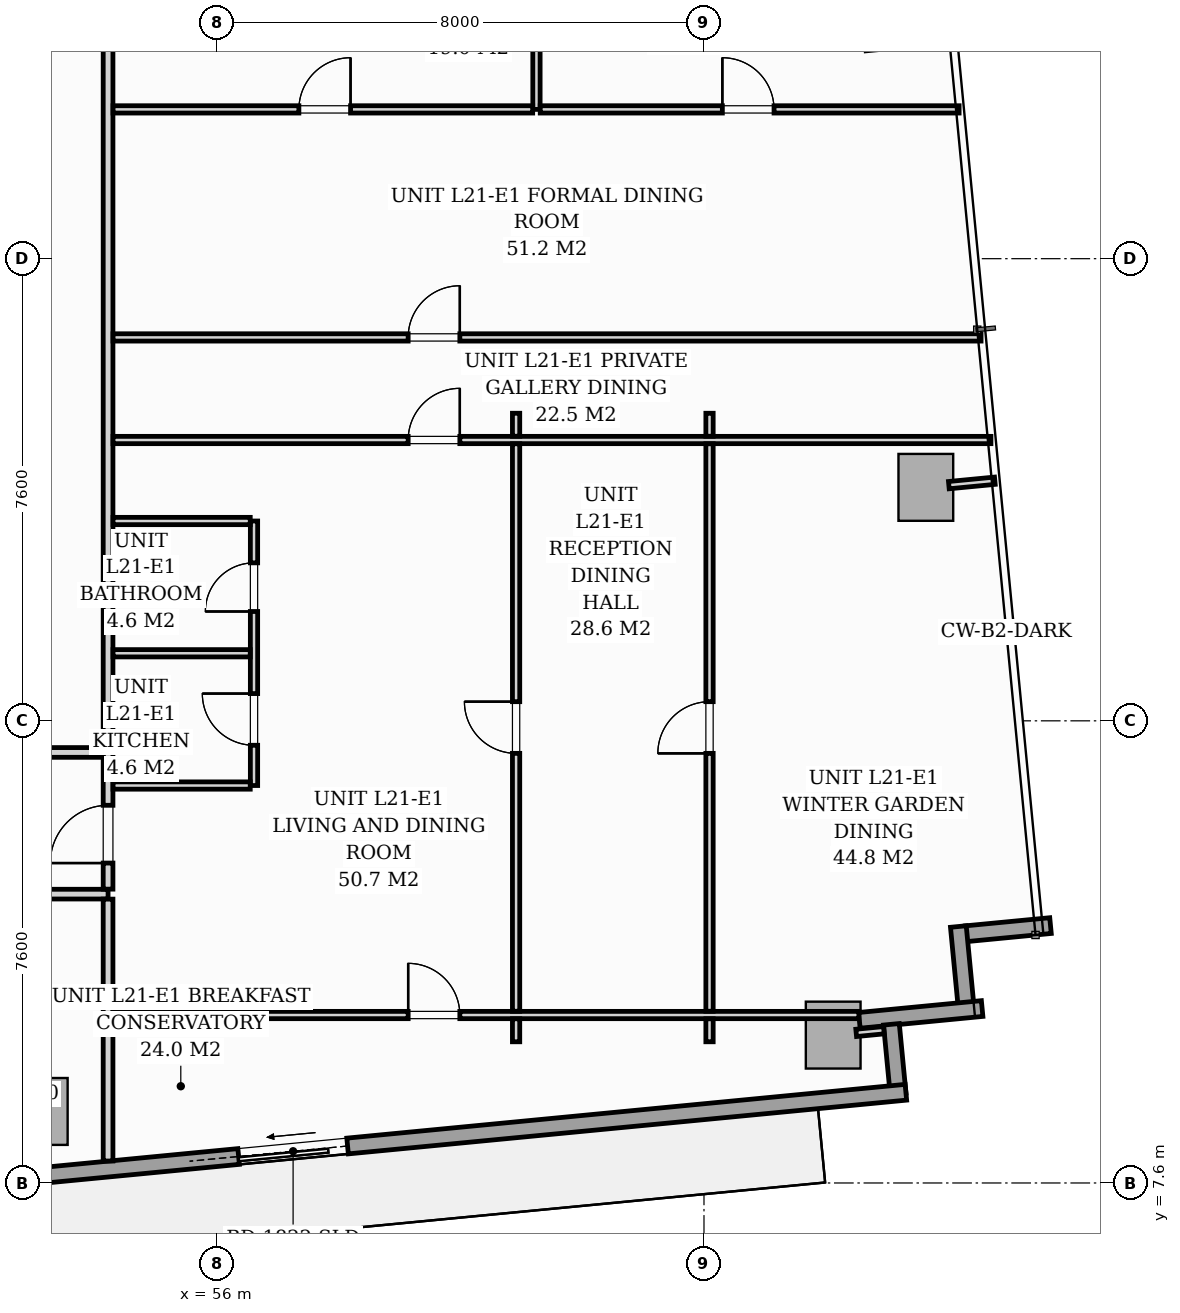
"""IFC4 building model, lengths in metres.
Left out: names, types, materials, properties, quantities, classifications, styles, units other than length and angle.
Written with IfcOpenShell. Run it as: python <this file> out.ifc"""

import sys

from ifc_helpers import new_model, si_unit, direction, frame, frame_2d, origin, origin_2d, place, context, subcontext, project, spatial, rectangle, extrude, source, transform, mapped, element, fill, save


model = new_model("IFC4")
c1 = context("Model", 3, precision=1e-05, world=origin(), true_north=direction((0.0, 1.0)))
c2 = subcontext(c1, "Body", "Model", "MODEL_VIEW")
j1 = project(units=[si_unit("LENGTHUNIT", "METRE"), si_unit("PLANEANGLEUNIT", "RADIAN")], contexts=[c1])
p1 = place(None, origin())
s1 = spatial("IfcSite", under=j1, at=p1, CompositionType="ELEMENT")
p2 = place(p1, origin())
s2 = spatial("IfcBuilding", under=s1, at=p2, CompositionType="ELEMENT")
p3 = place(p2, frame((0.0, 0.0, 77.8)))
s3 = spatial("IfcBuildingStorey", under=s2, at=p3, CompositionType="ELEMENT", Elevation=77.8)
m1 = source(origin(), c2, "Body", "SweptSolid", [
    extrude(rectangle(XDim=0.9, YDim=1.1, at=origin_2d()), origin(), (0.0, 0.0, 1.0), 3.194),
])
for number, where, z_axis, x_axis in (
    (1, (53.085, 8.776, 0.004), (0.0, 0.0, 1.0), (0.995, 0.096, 0.0)),
    (2, (66.125, 10.032, 0.004), (0.0, 0.0, 1.0), (0.995, 0.096, 0.0)),
    (3, (67.648, 19.039, 0.004), (0.0, 0.0, 1.0), (0.995, 0.096, 0.0)),
):
    element("IfcColumn", number, at=place(p3, frame(where, z_axis=z_axis, x_axis=x_axis)), inside=s3, PredefinedType="COLUMN", context=c2, shape_type="MappedRepresentation", body=[
        mapped(m1, transform((0.0, 0.0, 0.0), scale=1.0)),
    ])
for number, where, z_axis, x_axis in (
    (4, (69.698, 11.833, 0.0), (0.0, 0.0, 1.0), (-0.995, -0.096, 0.0)),
    (5, (68.183, 11.817, 0.0), (0.0, 0.0, 1.0), (0.096, -0.995, 0.0)),
):
    element("IfcWall", number, at=place(p3, frame(where, z_axis=z_axis, x_axis=x_axis)), inside=s3, PredefinedType="STANDARD", context=c2, shape_type="SweptSolid", body=[
        extrude(rectangle(XDim=1.395, YDim=0.26, at=frame_2d((0.697, 0.0))), origin(), (0.0, 0.0, 1.0), 2.94),
    ])
p4 = place(p3, frame((68.574, 10.469, 0.0), z_axis=(0.0, 0.0, 1.0), x_axis=(-0.99539865733, -0.095820211783, 0.0)))
e6 = element("IfcWall", 6, at=p4, inside=s3, PredefinedType="STANDARD", context=c2, shape_type="SweptSolid", body=[
    extrude(rectangle(XDim=2.028, YDim=0.26, at=frame_2d((1.014, 0.0))), origin(), (0.0, 0.0, 1.0), 2.94),
])
p5 = place(p3, frame((67.082, 10.209, 0.0), z_axis=(0.0, 0.0, 1.0), x_axis=(0.09576095695, -0.995404359607, 0.0)))
e7 = element("IfcWall", 7, at=p5, inside=s3, PredefinedType="STANDARD", context=c2, shape_type="SweptSolid", body=[
    extrude(rectangle(XDim=1.15, YDim=0.26, at=frame_2d((0.575, 0.0))), origin(), (0.0, 0.0, 1.0), 2.94),
])
p6 = place(p3, frame((67.32, 9.092, 0.0), z_axis=(0.0, 0.0, 1.0), x_axis=(-0.995396521236, -0.095842399342, 0.0)))
e8 = element("IfcWall", 8, at=p6, inside=s3, PredefinedType="STANDARD", context=c2, shape_type="SweptSolid", body=[
    extrude(rectangle(XDim=19.11, YDim=0.26, at=frame_2d((9.555, 0.0))), origin(), (0.0, 0.0, 1.0), 2.94),
])
p7 = place(p6, frame((9.224, 0.0, 0.0)))
e9 = element("IfcOpeningElement", 9, at=p7, cuts=e8, PredefinedType="OPENING", context=c2, shape_type="SweptSolid", body=[
    extrude(rectangle(XDim=1.8, YDim=2.06, at=frame_2d((0.9, 1.03))), frame((0.0, 0.14, 0.0), z_axis=(0.0, -1.0, 0.0), x_axis=(1.0, 0.0, 0.0)), (0.0, 0.0, 1.0), 0.28),
])
p8 = place(p6, frame((14.465, 0.0, 0.75)))
e10 = element("IfcOpeningElement", 10, at=p8, cuts=e8, PredefinedType="OPENING", context=c2, shape_type="SweptSolid", body=[
    extrude(rectangle(XDim=1.6, YDim=1.5, at=frame_2d((0.8, 0.75))), frame((0.0, 0.14, 0.0), z_axis=(0.0, -1.0, 0.0), x_axis=(1.0, 0.0, 0.0)), (0.0, 0.0, 1.0), 0.28),
])
p9 = place(p3, frame((16.6, 12.35, 0.0), z_axis=(0.0, 0.0, 1.0), x_axis=(1.0, 0.0, 0.0)))
e11 = element("IfcWall", 11, at=p9, inside=s3, PredefinedType="PARTITIONING", context=c2, shape_type="SweptSolid", body=[
    extrude(rectangle(XDim=37.6, YDim=0.16, at=frame_2d((18.8, 0.0))), origin(), (0.0, 0.0, 1.0), 2.94),
])
p10 = place(p9, frame((2.091, 0.0, 0.0)))
e12 = element("IfcOpeningElement", 12, at=p10, cuts=e11, PredefinedType="OPENING", context=c2, shape_type="SweptSolid", body=[
    extrude(rectangle(XDim=0.95, YDim=2.06, at=frame_2d((0.475, 1.03))), frame((0.0, 0.09, 0.0), z_axis=(0.0, -1.0, 0.0), x_axis=(1.0, 0.0, 0.0)), (0.0, 0.0, 1.0), 0.18),
])
p11 = place(p9, frame((26.146, 0.0, 0.0)))
e13 = element("IfcOpeningElement", 13, at=p11, cuts=e11, PredefinedType="OPENING", context=c2, shape_type="SweptSolid", body=[
    extrude(rectangle(XDim=0.95, YDim=2.06, at=frame_2d((0.475, 1.03))), frame((0.0, 0.09, 0.0), z_axis=(0.0, -1.0, 0.0), x_axis=(1.0, 0.0, 0.0)), (0.0, 0.0, 1.0), 0.18),
])
p12 = place(p3, frame((54.2, 7.961, 0.0), z_axis=(0.0, 0.0, 1.0), x_axis=(0.0, 1.0, 0.0)))
e14 = element("IfcWall", 14, at=p12, inside=s3, PredefinedType="PARTITIONING", context=c2, shape_type="SweptSolid", body=[
    extrude(rectangle(XDim=4.307, YDim=0.16, at=frame_2d((2.153, 0.0))), origin(), (0.0, 0.0, 1.0), 2.94),
])
p13 = place(p3, frame((54.2, 12.432, 0.0), z_axis=(0.0, 0.0, 1.0), x_axis=(0.0, 1.0, 0.0)))
e15 = element("IfcWall", 15, at=p13, inside=s3, PredefinedType="PARTITIONING", context=c2, shape_type="SweptSolid", body=[
    extrude(rectangle(XDim=15.095, YDim=0.16, at=frame_2d((7.548, 0.0))), origin(), (0.0, 0.0, 1.0), 2.94),
])
p14 = place(p13, frame((0.429, 0.0, 0.0)))
e16 = element("IfcOpeningElement", 16, at=p14, cuts=e15, PredefinedType="OPENING", context=c2, shape_type="SweptSolid", body=[
    extrude(rectangle(XDim=0.95, YDim=2.06, at=frame_2d((0.475, 1.03))), frame((0.0, 0.09, 0.0), z_axis=(0.0, -1.0, 0.0), x_axis=(1.0, 0.0, 0.0)), (0.0, 0.0, 1.0), 0.18),
])
p15 = place(p3, frame((56.6, 14.136, 0.0), z_axis=(0.0, 0.0, 1.0), x_axis=(0.0, 1.0, 0.0)))
e17 = element("IfcWall", 17, at=p15, inside=s3, PredefinedType="PARTITIONING", context=c2, shape_type="SweptSolid", body=[
    extrude(rectangle(XDim=4.35, YDim=0.12, at=frame_2d((2.175, 0.0))), origin(), (0.0, 0.0, 1.0), 2.94),
])
p16 = place(p15, frame((0.662, 0.0, 0.0)))
e18 = element("IfcOpeningElement", 18, at=p16, cuts=e17, PredefinedType="OPENING", context=c2, shape_type="SweptSolid", body=[
    extrude(rectangle(XDim=0.85, YDim=2.05, at=frame_2d((0.425, 1.025))), frame((0.0, 0.07, 0.0), z_axis=(0.0, -1.0, 0.0), x_axis=(1.0, 0.0, 0.0)), (0.0, 0.0, 1.0), 0.14),
])
p17 = place(p15, frame((2.862, 0.0, 0.0)))
e19 = element("IfcOpeningElement", 19, at=p17, cuts=e17, PredefinedType="OPENING", context=c2, shape_type="SweptSolid", body=[
    extrude(rectangle(XDim=0.8, YDim=2.02, at=frame_2d((0.4, 1.01))), frame((0.0, 0.07, 0.0), z_axis=(0.0, -1.0, 0.0), x_axis=(1.0, 0.0, 0.0)), (0.0, 0.0, 1.0), 0.14),
])
for number, where, z_axis, x_axis in (
    (20, (54.282, 16.311, 0.0), (0.0, 0.0, 1.0), (1.0, 0.0, 0.0)),
    (21, (54.282, 14.136, 0.0), (0.0, 0.0, 1.0), (1.0, 0.0, 0.0)),
    (22, (54.282, 18.486, 0.0), (0.0, 0.0, 1.0), (1.0, 0.0, 0.0)),
):
    element("IfcWall", number, at=place(p3, frame(where, z_axis=z_axis, x_axis=x_axis)), inside=s3, PredefinedType="PARTITIONING", context=c2, shape_type="SweptSolid", body=[
        extrude(rectangle(XDim=2.256, YDim=0.12, at=frame_2d((1.128, 0.0))), origin(), (0.0, 0.0, 1.0), 2.94),
    ])
p18 = place(p3, frame((61.245, 25.255, 0.0), z_axis=(0.0, 0.0, 1.0), x_axis=(0.0, 1.0, 0.0)))
e23 = element("IfcWall", 23, at=p18, inside=s3, PredefinedType="PARTITIONING", context=c2, shape_type="SweptSolid", body=[
    extrude(rectangle(XDim=2.951, YDim=0.12, at=frame_2d((1.476, 0.0))), origin(), (0.0, 0.0, 1.0), 2.94),
])
p19 = place(p3, frame((54.282, 25.255, 0.0), z_axis=(0.0, 0.0, 1.0), x_axis=(1.0, 0.0, 0.0)))
e24 = element("IfcWall", 24, at=p19, inside=s3, PredefinedType="PARTITIONING", context=c2, shape_type="SweptSolid", body=[
    extrude(rectangle(XDim=6.901, YDim=0.12, at=frame_2d((3.451, 0.0))), origin(), (0.0, 0.0, 1.0), 2.94),
])
p20 = place(p19, frame((3.056, 0.0, 0.0)))
e25 = element("IfcOpeningElement", 25, at=p20, cuts=e24, PredefinedType="OPENING", context=c2, shape_type="SweptSolid", body=[
    extrude(rectangle(XDim=0.85, YDim=2.05, at=frame_2d((0.425, 1.025))), frame((0.0, 0.07, 0.0), z_axis=(0.0, -1.0, 0.0), x_axis=(1.0, 0.0, 0.0)), (0.0, 0.0, 1.0), 0.14),
])
p21 = place(p3, frame((61.307, 25.255, 0.0), z_axis=(0.0, 0.0, 1.0), x_axis=(1.0, 0.0, 0.0)))
e26 = element("IfcWall", 26, at=p21, inside=s3, PredefinedType="PARTITIONING", context=c2, shape_type="SweptSolid", body=[
    extrude(rectangle(XDim=6.888, YDim=0.12, at=frame_2d((3.444, 0.0))), origin(), (0.0, 0.0, 1.0), 2.94),
])
p22 = place(p21, frame((2.995, 0.0, 0.0)))
e27 = element("IfcOpeningElement", 27, at=p22, cuts=e26, PredefinedType="OPENING", context=c2, shape_type="SweptSolid", body=[
    extrude(rectangle(XDim=0.85, YDim=2.05, at=frame_2d((0.425, 1.025))), frame((0.0, 0.07, 0.0), z_axis=(0.0, -1.0, 0.0), x_axis=(1.0, 0.0, 0.0)), (0.0, 0.0, 1.0), 0.14),
])
p23 = place(p3, frame((54.282, 21.505, 0.0), z_axis=(0.0, 0.0, 1.0), x_axis=(1.0, 0.0, 0.0)))
e28 = element("IfcWall", 28, at=p23, inside=s3, PredefinedType="PARTITIONING", context=c2, shape_type="SweptSolid", body=[
    extrude(rectangle(XDim=14.274, YDim=0.12, at=frame_2d((7.137, 0.0))), origin(), (0.0, 0.0, 1.0), 2.94),
])
p24 = place(p23, frame((4.853, 0.0, 0.0)))
e29 = element("IfcOpeningElement", 29, at=p24, cuts=e28, PredefinedType="OPENING", context=c2, shape_type="SweptSolid", body=[
    extrude(rectangle(XDim=0.85, YDim=2.05, at=frame_2d((0.425, 1.025))), frame((0.0, 0.07, 0.0), z_axis=(0.0, -1.0, 0.0), x_axis=(1.0, 0.0, 0.0)), (0.0, 0.0, 1.0), 0.14),
])
p25 = place(p3, frame((54.282, 10.362, 0.0), z_axis=(0.0, 0.0, 1.0), x_axis=(1.0, 0.0, 0.0)))
e30 = element("IfcWall", 30, at=p25, inside=s3, PredefinedType="PARTITIONING", context=c2, shape_type="SweptSolid", body=[
    extrude(rectangle(XDim=12.265, YDim=0.12, at=frame_2d((6.132, 0.0))), origin(), (0.0, 0.0, 1.0), 2.94),
])
p26 = place(p25, frame((4.853, 0.0, 0.0)))
e31 = element("IfcOpeningElement", 31, at=p26, cuts=e30, PredefinedType="OPENING", context=c2, shape_type="SweptSolid", body=[
    extrude(rectangle(XDim=0.85, YDim=2.05, at=frame_2d((0.425, 1.025))), frame((0.0, 0.07, 0.0), z_axis=(0.0, -1.0, 0.0), x_axis=(1.0, 0.0, 0.0)), (0.0, 0.0, 1.0), 0.14),
])
p27 = place(p3, frame((54.282, 19.818, 0.0), z_axis=(0.0, 0.0, 1.0), x_axis=(1.0, 0.0, 0.0)))
e32 = element("IfcWall", 32, at=p27, inside=s3, PredefinedType="PARTITIONING", context=c2, shape_type="SweptSolid", body=[
    extrude(rectangle(XDim=14.437, YDim=0.12, at=frame_2d((7.218, 0.0))), origin(), (0.0, 0.0, 1.0), 2.94),
])
p28 = place(p27, frame((4.853, 0.0, 0.0)))
e33 = element("IfcOpeningElement", 33, at=p28, cuts=e32, PredefinedType="OPENING", context=c2, shape_type="SweptSolid", body=[
    extrude(rectangle(XDim=0.85, YDim=2.05, at=frame_2d((0.425, 1.025))), frame((0.0, 0.07, 0.0), z_axis=(0.0, -1.0, 0.0), x_axis=(1.0, 0.0, 0.0)), (0.0, 0.0, 1.0), 0.14),
])
p29 = place(p3, frame((64.091, 9.922, 0.0), z_axis=(0.0, 0.0, 1.0), x_axis=(0.0, 1.0, 0.0)))
e34 = element("IfcWall", 34, at=p29, inside=s3, PredefinedType="PARTITIONING", context=c2, shape_type="SweptSolid", body=[
    extrude(rectangle(XDim=0.378, YDim=0.12, at=frame_2d((0.189, 0.0))), origin(), (0.0, 0.0, 1.0), 2.94),
])
p30 = place(p3, frame((64.091, 10.424, 0.0), z_axis=(0.0, 0.0, 1.0), x_axis=(0.0, 1.0, 0.0)))
e35 = element("IfcWall", 35, at=p30, inside=s3, PredefinedType="PARTITIONING", context=c2, shape_type="SweptSolid", body=[
    extrude(rectangle(XDim=9.332, YDim=0.12, at=frame_2d((4.666, 0.0))), origin(), (0.0, 0.0, 1.0), 2.94),
])
p31 = place(p30, frame((4.241, 0.0, 0.0)))
e36 = element("IfcOpeningElement", 36, at=p31, cuts=e35, PredefinedType="OPENING", context=c2, shape_type="SweptSolid", body=[
    extrude(rectangle(XDim=0.85, YDim=2.05, at=frame_2d((0.425, 1.025))), frame((0.0, 0.07, 0.0), z_axis=(0.0, -1.0, 0.0), x_axis=(1.0, 0.0, 0.0)), (0.0, 0.0, 1.0), 0.14),
])
p32 = place(p3, frame((64.091, 19.88, 0.0), z_axis=(0.0, 0.0, 1.0), x_axis=(0.0, 1.0, 0.0)))
e37 = element("IfcWall", 37, at=p32, inside=s3, PredefinedType="PARTITIONING", context=c2, shape_type="SweptSolid", body=[
    extrude(rectangle(XDim=0.378, YDim=0.12, at=frame_2d((0.189, 0.0))), origin(), (0.0, 0.0, 1.0), 2.94),
])
p33 = place(p3, frame((60.91, 9.922, 0.0), z_axis=(0.0, 0.0, 1.0), x_axis=(0.0, 1.0, 0.0)))
e38 = element("IfcWall", 38, at=p33, inside=s3, PredefinedType="PARTITIONING", context=c2, shape_type="SweptSolid", body=[
    extrude(rectangle(XDim=0.378, YDim=0.12, at=frame_2d((0.189, 0.0))), origin(), (0.0, 0.0, 1.0), 2.94),
])
p34 = place(p3, frame((60.91, 10.424, 0.0), z_axis=(0.0, 0.0, 1.0), x_axis=(0.0, 1.0, 0.0)))
e39 = element("IfcWall", 39, at=p34, inside=s3, PredefinedType="PARTITIONING", context=c2, shape_type="SweptSolid", body=[
    extrude(rectangle(XDim=9.332, YDim=0.12, at=frame_2d((4.666, 0.0))), origin(), (0.0, 0.0, 1.0), 2.94),
])
p35 = place(p34, frame((4.241, 0.0, 0.0)))
e40 = element("IfcOpeningElement", 40, at=p35, cuts=e39, PredefinedType="OPENING", context=c2, shape_type="SweptSolid", body=[
    extrude(rectangle(XDim=0.85, YDim=2.05, at=frame_2d((0.425, 1.025))), frame((0.0, 0.07, 0.0), z_axis=(0.0, -1.0, 0.0), x_axis=(1.0, 0.0, 0.0)), (0.0, 0.0, 1.0), 0.14),
])
p36 = place(p3, frame((60.91, 19.88, 0.0), z_axis=(0.0, 0.0, 1.0), x_axis=(0.0, 1.0, 0.0)))
e41 = element("IfcWall", 41, at=p36, inside=s3, PredefinedType="PARTITIONING", context=c2, shape_type="SweptSolid", body=[
    extrude(rectangle(XDim=0.378, YDim=0.12, at=frame_2d((0.189, 0.0))), origin(), (0.0, 0.0, 1.0), 2.94),
])
p37 = place(p3, frame((45.84, 14.68, 0.0), z_axis=(0.0, 0.0, 1.0), x_axis=(1.0, 0.0, 0.0)))
e42 = element("IfcWall", 42, at=p37, inside=s3, PredefinedType="PARTITIONING", context=c2, shape_type="SweptSolid", body=[
    extrude(rectangle(XDim=8.278, YDim=0.16, at=frame_2d((4.139, 0.0))), origin(), (0.0, 0.0, 1.0), 2.94),
])
p38 = place(p37, frame((3.765, 0.0, 0.0)))
e43 = element("IfcOpeningElement", 43, at=p38, cuts=e42, PredefinedType="OPENING", context=c2, shape_type="SweptSolid", body=[
    extrude(rectangle(XDim=0.95, YDim=2.06, at=frame_2d((0.475, 1.03))), frame((0.0, 0.09, 0.0), z_axis=(0.0, -1.0, 0.0), x_axis=(1.0, 0.0, 0.0)), (0.0, 0.0, 1.0), 0.18),
])
p39 = place(p3, frame((66.503, 10.068, 0.0), z_axis=(0.0, 0.0, 1.0), x_axis=(0.995389482415, 0.095915474751, 0.0)))
e44 = element("IfcWall", 44, at=p39, inside=s3, PredefinedType="PARTITIONING", context=c2, shape_type="SweptSolid", body=[
    extrude(rectangle(XDim=0.458, YDim=0.12, at=frame_2d((0.229, 0.0))), origin(), (0.0, 0.0, 1.0), 2.94),
])
p40 = place(p3, frame((68.027, 19.076, 0.0), z_axis=(0.0, 0.0, 1.0), x_axis=(0.995377786728, 0.096036772582, 0.0)))
e45 = element("IfcWall", 45, at=p40, inside=s3, PredefinedType="PARTITIONING", context=c2, shape_type="SweptSolid", body=[
    extrude(rectangle(XDim=0.76, YDim=0.12, at=frame_2d((0.38, 0.0))), origin(), (0.0, 0.0, 1.0), 2.94),
])
m2 = source(origin(), c2, "Body", "SweptSolid", [
    extrude(rectangle(XDim=1.8, YDim=2.06, at=frame_2d((0.9, 1.03))), frame((0.0, 0.025, 0.0), z_axis=(0.0, -1.0, 0.0), x_axis=(1.0, 0.0, 0.0)), (0.0, 0.0, 1.0), 0.05),
])
p41 = place(p7, origin())
e46 = element("IfcDoor", 46, at=p41, inside=s3, OperationType="SLIDING_TO_RIGHT", PredefinedType="DOOR", context=c2, shape_type="MappedRepresentation", body=[
    mapped(m2, transform((0.0, 0.0, 0.0), scale=1.0)),
])
fill(e9, e46)
m3 = source(origin(), c2, "Body", "SweptSolid", [
    extrude(rectangle(XDim=0.95, YDim=2.06, at=frame_2d((0.475, 1.03))), frame((0.0, 0.025, 0.0), z_axis=(0.0, -1.0, 0.0), x_axis=(1.0, 0.0, 0.0)), (0.0, 0.0, 1.0), 0.05),
])
p42 = place(p14, origin())
e47 = element("IfcDoor", 47, at=p42, inside=s3, OperationType="SINGLE_SWING_LEFT", PredefinedType="DOOR", context=c2, shape_type="MappedRepresentation", body=[
    mapped(m3, transform((0.0, 0.0, 0.0), scale=1.0)),
])
fill(e16, e47)
m4 = source(origin(), c2, "Body", "SweptSolid", [
    extrude(rectangle(XDim=0.85, YDim=2.05, at=frame_2d((0.425, 1.025))), frame((0.0, 0.025, 0.0), z_axis=(0.0, -1.0, 0.0), x_axis=(1.0, 0.0, 0.0)), (0.0, 0.0, 1.0), 0.05),
])
p43 = place(p16, origin())
e48 = element("IfcDoor", 48, at=p43, inside=s3, OperationType="SINGLE_SWING_RIGHT", PredefinedType="DOOR", context=c2, shape_type="MappedRepresentation", body=[
    mapped(m4, transform((0.0, 0.0, 0.0), scale=1.0)),
])
fill(e18, e48)
m5 = source(origin(), c2, "Body", "SweptSolid", [
    extrude(rectangle(XDim=0.8, YDim=2.02, at=frame_2d((0.4, 1.01))), frame((0.0, 0.025, 0.0), z_axis=(0.0, -1.0, 0.0), x_axis=(1.0, 0.0, 0.0)), (0.0, 0.0, 1.0), 0.05),
])
p44 = place(p17, origin())
e49 = element("IfcDoor", 49, at=p44, inside=s3, OperationType="SINGLE_SWING_LEFT", PredefinedType="DOOR", context=c2, shape_type="MappedRepresentation", body=[
    mapped(m5, transform((0.0, 0.0, 0.0), scale=1.0)),
])
fill(e19, e49)
p45 = place(p20, origin())
e50 = element("IfcDoor", 50, at=p45, inside=s3, OperationType="SINGLE_SWING_RIGHT", PredefinedType="DOOR", context=c2, shape_type="MappedRepresentation", body=[
    mapped(m4, transform((0.0, 0.0, 0.0), scale=1.0)),
])
fill(e25, e50)
p46 = place(p22, origin())
e51 = element("IfcDoor", 51, at=p46, inside=s3, OperationType="SINGLE_SWING_LEFT", PredefinedType="DOOR", context=c2, shape_type="MappedRepresentation", body=[
    mapped(m4, transform((0.0, 0.0, 0.0), scale=1.0)),
])
fill(e27, e51)
p47 = place(p24, origin())
e52 = element("IfcDoor", 52, at=p47, inside=s3, OperationType="SINGLE_SWING_RIGHT", PredefinedType="DOOR", context=c2, shape_type="MappedRepresentation", body=[
    mapped(m4, transform((0.0, 0.0, 0.0), scale=1.0)),
])
fill(e29, e52)
p48 = place(p26, origin())
e53 = element("IfcDoor", 53, at=p48, inside=s3, OperationType="SINGLE_SWING_LEFT", PredefinedType="DOOR", context=c2, shape_type="MappedRepresentation", body=[
    mapped(m4, transform((0.0, 0.0, 0.0), scale=1.0)),
])
fill(e31, e53)
p49 = place(p28, origin())
e54 = element("IfcDoor", 54, at=p49, inside=s3, OperationType="SINGLE_SWING_RIGHT", PredefinedType="DOOR", context=c2, shape_type="MappedRepresentation", body=[
    mapped(m4, transform((0.0, 0.0, 0.0), scale=1.0)),
])
fill(e33, e54)
p50 = place(p31, origin())
e55 = element("IfcDoor", 55, at=p50, inside=s3, OperationType="SINGLE_SWING_LEFT", PredefinedType="DOOR", context=c2, shape_type="MappedRepresentation", body=[
    mapped(m4, transform((0.0, 0.0, 0.0), scale=1.0)),
])
fill(e36, e55)
p51 = place(p35, origin())
e56 = element("IfcDoor", 56, at=p51, inside=s3, OperationType="SINGLE_SWING_RIGHT", PredefinedType="DOOR", context=c2, shape_type="MappedRepresentation", body=[
    mapped(m4, transform((0.0, 0.0, 0.0), scale=1.0)),
])
fill(e40, e56)
save(model, sys.argv[1])
